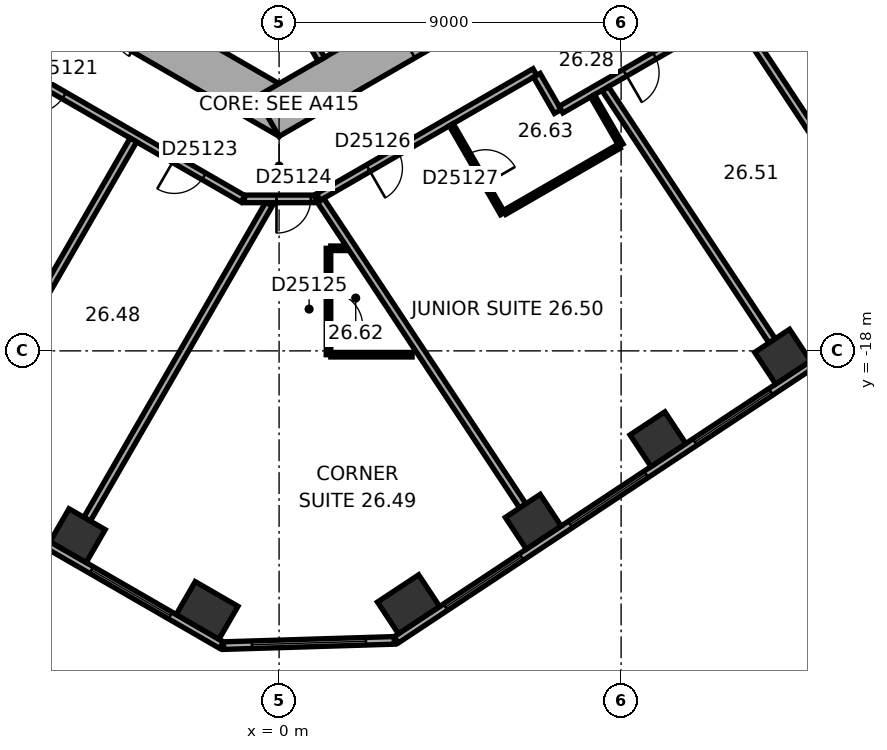
"""IFC4 building model, lengths in metres.
Left out: names, types, materials, properties, quantities, classifications, styles, units other than length and angle.
Written with IfcOpenShell. Run it as: python <this file> out.ifc"""

import sys

from ifc_helpers import new_model, si_unit, direction, frame, frame_2d, origin, origin_2d, place, context, subcontext, project, spatial, rectangle, extrude, element, fill, save


model = new_model("IFC4")
c1 = context("Model", 3, precision=1e-05, world=origin(), true_north=direction((0.0, 1.0)))
c2 = subcontext(c1, "Body", "Model", "MODEL_VIEW")
j1 = project(units=[si_unit("LENGTHUNIT", "METRE"), si_unit("PLANEANGLEUNIT", "RADIAN")], contexts=[c1])
p1 = place(None, origin())
s1 = spatial("IfcSite", under=j1, at=p1, CompositionType="ELEMENT")
p2 = place(p1, origin())
s2 = spatial("IfcBuilding", under=s1, at=p2, CompositionType="ELEMENT")
p3 = place(p2, frame((0.0, 0.0, 110.0)))
s3 = spatial("IfcBuildingStorey", under=s2, at=p3, CompositionType="ELEMENT", Elevation=110.0)
p4 = place(p3, frame((-5.302, -22.862, 0.0), z_axis=(0.0, 0.0, 1.0), x_axis=(0.866025403784, -0.5, 0.0)))
e1 = element("IfcColumn", 1, at=p4, inside=s3, PredefinedType="COLUMN", context=c2, shape_type="SweptSolid", body=[
    extrude(rectangle(XDim=1.1, YDim=1.0, at=origin_2d()), origin(), (0.0, 0.0, 1.0), 3.3),
])
for number, where, z_axis, x_axis in (
    (2, (-1.895, -24.829, 0.0), (0.0, 0.0, 1.0), (0.866, -0.5, 0.0)),
    (3, (3.407, -24.667, 0.0), (0.0, 0.0, 1.0), (0.834, 0.552, 0.0)),
):
    element("IfcColumn", number, at=place(p3, frame(where, z_axis=z_axis, x_axis=x_axis)), inside=s3, PredefinedType="COLUMN", context=c2, shape_type="SweptSolid", body=[
        extrude(rectangle(XDim=1.3, YDim=1.0, at=origin_2d()), origin(), (0.0, 0.0, 1.0), 3.3),
    ])
for number, where, z_axis, x_axis in (
    (4, (6.688, -22.496, 0.0), (0.0, 0.0, 1.0), (0.834, 0.552, 0.0)),
    (5, (9.969, -20.324, 0.0), (0.0, 0.0, 1.0), (0.834, 0.552, 0.0)),
    (6, (13.25, -18.152, 0.0), (0.0, 0.0, 1.0), (0.834, 0.552, 0.0)),
):
    element("IfcColumn", number, at=place(p3, frame(where, z_axis=z_axis, x_axis=x_axis)), inside=s3, PredefinedType="COLUMN", context=c2, shape_type="SweptSolid", body=[
        extrude(rectangle(XDim=1.1, YDim=1.0, at=origin_2d()), origin(), (0.0, 0.0, 1.0), 3.3),
    ])
p5 = place(p3, frame((-10.4, -5.658, 0.0), z_axis=(0.0, 0.0, 1.0), x_axis=(0.866021384402, -0.500006961711, 0.0)))
e7 = element("IfcWall", 7, at=p5, inside=s3, PredefinedType="SHEAR", context=c2, shape_type="SweptSolid", body=[
    extrude(rectangle(XDim=12.355, YDim=1.2, at=frame_2d((6.178, 0.0))), origin(), (0.0, 0.0, 1.0), 3.3),
])
p6 = place(p5, frame((6.378, 0.0, 0.0)))
e8 = element("IfcOpeningElement", 8, at=p6, cuts=e7, PredefinedType="OPENING", context=c2, shape_type="SweptSolid", body=[
    extrude(rectangle(XDim=1.5, YDim=2.1, at=frame_2d((0.75, 1.05))), frame((0.0, 0.61, 0.0), z_axis=(0.0, -1.0, 0.0), x_axis=(1.0, 0.0, 0.0)), (0.0, 0.0, 1.0), 1.22),
])
p7 = place(p5, frame((1.928, 0.0, 0.0)))
e9 = element("IfcOpeningElement", 9, at=p7, cuts=e7, PredefinedType="OPENING", context=c2, shape_type="SweptSolid", body=[
    extrude(rectangle(XDim=0.9, YDim=2.1, at=frame_2d((0.45, 1.05))), frame((0.0, 0.61, 0.0), z_axis=(0.0, -1.0, 0.0), x_axis=(1.0, 0.0, 0.0)), (0.0, 0.0, 1.0), 1.22),
])
p8 = place(p5, frame((4.528, 0.0, 0.0)))
e10 = element("IfcOpeningElement", 10, at=p8, cuts=e7, PredefinedType="OPENING", context=c2, shape_type="SweptSolid", body=[
    extrude(rectangle(XDim=0.9, YDim=2.1, at=frame_2d((0.45, 1.05))), frame((0.0, 0.61, 0.0), z_axis=(0.0, -1.0, 0.0), x_axis=(1.0, 0.0, 0.0)), (0.0, 0.0, 1.0), 1.22),
])
p9 = place(p3, frame((-0.3, -11.836, 0.0), z_axis=(0.0, 0.0, 1.0), x_axis=(0.866021384402, 0.500006961711, 0.0)))
e11 = element("IfcWall", 11, at=p9, inside=s3, PredefinedType="SHEAR", context=c2, shape_type="SweptSolid", body=[
    extrude(rectangle(XDim=12.355, YDim=1.2, at=frame_2d((6.178, 0.0))), origin(), (0.0, 0.0, 1.0), 3.3),
])
p10 = place(p9, frame((4.128, 0.0, 0.0)))
e12 = element("IfcOpeningElement", 12, at=p10, cuts=e11, PredefinedType="OPENING", context=c2, shape_type="SweptSolid", body=[
    extrude(rectangle(XDim=0.9, YDim=2.1, at=frame_2d((0.45, 1.05))), frame((0.0, 0.61, 0.0), z_axis=(0.0, -1.0, 0.0), x_axis=(1.0, 0.0, 0.0)), (0.0, 0.0, 1.0), 1.22),
])
p11 = place(p9, frame((7.928, 0.0, 0.0)))
e13 = element("IfcOpeningElement", 13, at=p11, cuts=e11, PredefinedType="OPENING", context=c2, shape_type="SweptSolid", body=[
    extrude(rectangle(XDim=1.1, YDim=2.1, at=frame_2d((0.55, 1.05))), frame((0.0, 0.61, 0.0), z_axis=(0.0, -1.0, 0.0), x_axis=(1.0, 0.0, 0.0)), (0.0, 0.0, 1.0), 1.22),
])
p12 = place(p3, frame((-19.914, -15.119, 0.0), z_axis=(0.0, 0.0, 1.0), x_axis=(0.866025418898, -0.499999973822, 0.0)))
e14 = element("IfcWall", 14, at=p12, inside=s3, PredefinedType="STANDARD", context=c2, shape_type="SweptSolid", body=[
    extrude(rectangle(XDim=21.246, YDim=0.2, at=frame_2d((10.623, 0.0))), origin(), (0.0, 0.0, 1.0), 3.3),
])
p13 = place(p12, frame((1.555, 0.0, 0.8)))
e15 = element("IfcOpeningElement", 15, at=p13, cuts=e14, PredefinedType="OPENING", context=c2, shape_type="SweptSolid", body=[
    extrude(rectangle(XDim=2.4, YDim=1.7, at=frame_2d((1.2, 0.85))), frame((0.0, 0.11, 0.0), z_axis=(0.0, -1.0, 0.0), x_axis=(1.0, 0.0, 0.0)), (0.0, 0.0, 1.0), 0.22),
])
p14 = place(p12, frame((5.489, 0.0, 0.8)))
e16 = element("IfcOpeningElement", 16, at=p14, cuts=e14, PredefinedType="OPENING", context=c2, shape_type="SweptSolid", body=[
    extrude(rectangle(XDim=2.4, YDim=1.7, at=frame_2d((1.2, 0.85))), frame((0.0, 0.11, 0.0), z_axis=(0.0, -1.0, 0.0), x_axis=(1.0, 0.0, 0.0)), (0.0, 0.0, 1.0), 0.22),
])
p15 = place(p12, frame((9.424, 0.0, 0.8)))
e17 = element("IfcOpeningElement", 17, at=p15, cuts=e14, PredefinedType="OPENING", context=c2, shape_type="SweptSolid", body=[
    extrude(rectangle(XDim=2.4, YDim=1.7, at=frame_2d((1.2, 0.85))), frame((0.0, 0.11, 0.0), z_axis=(0.0, -1.0, 0.0), x_axis=(1.0, 0.0, 0.0)), (0.0, 0.0, 1.0), 0.22),
])
p16 = place(p12, frame((13.358, 0.0, 0.8)))
e18 = element("IfcOpeningElement", 18, at=p16, cuts=e14, PredefinedType="OPENING", context=c2, shape_type="SweptSolid", body=[
    extrude(rectangle(XDim=2.4, YDim=1.7, at=frame_2d((1.2, 0.85))), frame((0.0, 0.11, 0.0), z_axis=(0.0, -1.0, 0.0), x_axis=(1.0, 0.0, 0.0)), (0.0, 0.0, 1.0), 0.22),
])
p17 = place(p12, frame((17.293, 0.0, 0.8)))
e19 = element("IfcOpeningElement", 19, at=p17, cuts=e14, PredefinedType="OPENING", context=c2, shape_type="SweptSolid", body=[
    extrude(rectangle(XDim=2.4, YDim=1.7, at=frame_2d((1.2, 0.85))), frame((0.0, 0.11, 0.0), z_axis=(0.0, -1.0, 0.0), x_axis=(1.0, 0.0, 0.0)), (0.0, 0.0, 1.0), 0.22),
])
p18 = place(p3, frame((-1.461, -25.755, 0.0), z_axis=(0.0, 0.0, 1.0), x_axis=(0.999533823446, 0.030530898895, 0.0)))
e20 = element("IfcWall", 20, at=p18, inside=s3, PredefinedType="STANDARD", context=c2, shape_type="SweptSolid", body=[
    extrude(rectangle(XDim=4.494, YDim=0.2, at=frame_2d((2.247, 0.0))), origin(), (0.0, 0.0, 1.0), 3.3),
])
p19 = place(p18, frame((0.747, 0.0, 0.8)))
e21 = element("IfcOpeningElement", 21, at=p19, cuts=e20, PredefinedType="OPENING", context=c2, shape_type="SweptSolid", body=[
    extrude(rectangle(XDim=3.0, YDim=1.7, at=frame_2d((1.5, 0.85))), frame((0.0, 0.11, 0.0), z_axis=(0.0, -1.0, 0.0), x_axis=(1.0, 0.0, 0.0)), (0.0, 0.0, 1.0), 0.22),
])
p20 = place(p3, frame((3.083, -25.601, 0.0), z_axis=(0.0, 0.0, 1.0), x_axis=(0.833884295743, 0.551939291329, 0.0)))
e22 = element("IfcWall", 22, at=p20, inside=s3, PredefinedType="STANDARD", context=c2, shape_type="SweptSolid", body=[
    extrude(rectangle(XDim=21.246, YDim=0.2, at=frame_2d((10.623, 0.0))), origin(), (0.0, 0.0, 1.0), 3.3),
])
p21 = place(p20, frame((1.553, 0.0, 0.8)))
e23 = element("IfcOpeningElement", 23, at=p21, cuts=e22, PredefinedType="OPENING", context=c2, shape_type="SweptSolid", body=[
    extrude(rectangle(XDim=2.4, YDim=1.7, at=frame_2d((1.2, 0.85))), frame((0.0, 0.11, 0.0), z_axis=(0.0, -1.0, 0.0), x_axis=(1.0, 0.0, 0.0)), (0.0, 0.0, 1.0), 0.22),
])
p22 = place(p20, frame((5.488, 0.0, 0.8)))
e24 = element("IfcOpeningElement", 24, at=p22, cuts=e22, PredefinedType="OPENING", context=c2, shape_type="SweptSolid", body=[
    extrude(rectangle(XDim=2.4, YDim=1.7, at=frame_2d((1.2, 0.85))), frame((0.0, 0.11, 0.0), z_axis=(0.0, -1.0, 0.0), x_axis=(1.0, 0.0, 0.0)), (0.0, 0.0, 1.0), 0.22),
])
p23 = place(p20, frame((9.422, 0.0, 0.8)))
e25 = element("IfcOpeningElement", 25, at=p23, cuts=e22, PredefinedType="OPENING", context=c2, shape_type="SweptSolid", body=[
    extrude(rectangle(XDim=2.4, YDim=1.7, at=frame_2d((1.2, 0.85))), frame((0.0, 0.11, 0.0), z_axis=(0.0, -1.0, 0.0), x_axis=(1.0, 0.0, 0.0)), (0.0, 0.0, 1.0), 0.22),
])
p24 = place(p20, frame((13.357, 0.0, 0.8)))
e26 = element("IfcOpeningElement", 26, at=p24, cuts=e22, PredefinedType="OPENING", context=c2, shape_type="SweptSolid", body=[
    extrude(rectangle(XDim=2.4, YDim=1.7, at=frame_2d((1.2, 0.85))), frame((0.0, 0.11, 0.0), z_axis=(0.0, -1.0, 0.0), x_axis=(1.0, 0.0, 0.0)), (0.0, 0.0, 1.0), 0.22),
])
p25 = place(p20, frame((17.291, 0.0, 0.8)))
e27 = element("IfcOpeningElement", 27, at=p25, cuts=e22, PredefinedType="OPENING", context=c2, shape_type="SweptSolid", body=[
    extrude(rectangle(XDim=2.4, YDim=1.7, at=frame_2d((1.2, 0.85))), frame((0.0, 0.11, 0.0), z_axis=(0.0, -1.0, 0.0), x_axis=(1.0, 0.0, 0.0)), (0.0, 0.0, 1.0), 0.22),
])
p26 = place(p3, frame((0.013, -8.422, 0.0), z_axis=(0.0, 0.0, 1.0), x_axis=(0.500077893725, -0.86598042715, 0.0)))
e28 = element("IfcWall", 28, at=p26, inside=s3, PredefinedType="PARTITIONING", context=c2, shape_type="SweptSolid", body=[
    extrude(rectangle(XDim=2.2, YDim=0.2, at=frame_2d((1.1, 0.0))), origin(), (0.0, 0.0, 1.0), 3.05),
])
p27 = place(p3, frame((-11.615, -7.843, 0.0), z_axis=(0.0, 0.0, 1.0), x_axis=(0.866026466995, -0.499998158461, 0.0)))
e29 = element("IfcWall", 29, at=p27, inside=s3, PredefinedType="PARTITIONING", context=c2, shape_type="SweptSolid", body=[
    extrude(rectangle(XDim=12.315, YDim=0.2, at=frame_2d((6.158, 0.0))), origin(), (0.0, 0.0, 1.0), 3.05),
])
p28 = place(p27, frame((5.983, 0.0, 0.0)))
e30 = element("IfcOpeningElement", 30, at=p28, cuts=e29, PredefinedType="OPENING", context=c2, shape_type="SweptSolid", body=[
    extrude(rectangle(XDim=0.9, YDim=2.1, at=frame_2d((0.45, 1.05))), frame((0.0, 0.11, 0.0), z_axis=(0.0, -1.0, 0.0), x_axis=(1.0, 0.0, 0.0)), (0.0, 0.0, 1.0), 0.22),
])
p29 = place(p27, frame((10.229, 0.0, 0.0)))
e31 = element("IfcOpeningElement", 31, at=p29, cuts=e29, PredefinedType="OPENING", context=c2, shape_type="SweptSolid", body=[
    extrude(rectangle(XDim=0.9, YDim=2.1, at=frame_2d((0.45, 1.05))), frame((0.0, 0.11, 0.0), z_axis=(0.0, -1.0, 0.0), x_axis=(1.0, 0.0, 0.0)), (0.0, 0.0, 1.0), 0.22),
])
p30 = place(p3, frame((-8.46, -20.461, 0.0), z_axis=(0.0, 0.0, 1.0), x_axis=(0.499999662836, 0.866025598446, 0.0)))
e32 = element("IfcWall", 32, at=p30, inside=s3, PredefinedType="PARTITIONING", context=c2, shape_type="SweptSolid", body=[
    extrude(rectangle(XDim=9.25, YDim=0.2, at=frame_2d((4.625, 0.0))), origin(), (0.0, 0.0, 1.0), 3.05),
])
p31 = place(p3, frame((-5.052, -22.429, 0.0), z_axis=(0.0, 0.0, 1.0), x_axis=(0.500004329283, 0.866022904257, 0.0)))
e33 = element("IfcWall", 33, at=p31, inside=s3, PredefinedType="PARTITIONING", context=c2, shape_type="SweptSolid", body=[
    extrude(rectangle(XDim=9.572, YDim=0.2, at=frame_2d((4.786, 0.0))), origin(), (0.0, 0.0, 1.0), 3.05),
])
p32 = place(p3, frame((-0.91, -14.001, 0.0), z_axis=(0.0, 0.0, 1.0), x_axis=(1.0, 0.0, 0.0)))
e34 = element("IfcWall", 34, at=p32, inside=s3, PredefinedType="PARTITIONING", context=c2, shape_type="SweptSolid", body=[
    extrude(rectangle(XDim=1.86, YDim=0.2, at=frame_2d((0.93, 0.0))), origin(), (0.0, 0.0, 1.0), 3.05),
])
p33 = place(p32, frame((0.842, 0.0, 0.0)))
e35 = element("IfcOpeningElement", 35, at=p33, cuts=e34, PredefinedType="OPENING", context=c2, shape_type="SweptSolid", body=[
    extrude(rectangle(XDim=0.9, YDim=2.1, at=frame_2d((0.45, 1.05))), frame((0.0, 0.11, 0.0), z_axis=(0.0, -1.0, 0.0), x_axis=(1.0, 0.0, 0.0)), (0.0, 0.0, 1.0), 0.22),
])
p34 = place(p3, frame((1.033, -13.953, 0.0), z_axis=(0.0, 0.0, 1.0), x_axis=(0.866017531406, 0.500013635111, 0.0)))
e36 = element("IfcWall", 36, at=p34, inside=s3, PredefinedType="PARTITIONING", context=c2, shape_type="SweptSolid", body=[
    extrude(rectangle(XDim=6.58, YDim=0.2, at=frame_2d((3.29, 0.0))), origin(), (0.0, 0.0, 1.0), 3.05),
])
p35 = place(p34, frame((1.515, 0.0, 0.0)))
e37 = element("IfcOpeningElement", 37, at=p35, cuts=e36, PredefinedType="OPENING", context=c2, shape_type="SweptSolid", body=[
    extrude(rectangle(XDim=0.9, YDim=2.1, at=frame_2d((0.45, 1.05))), frame((0.0, 0.11, 0.0), z_axis=(0.0, -1.0, 0.0), x_axis=(1.0, 0.0, 0.0)), (0.0, 0.0, 1.0), 0.22),
])
p36 = place(p3, frame((1.3, -18.101, 0.0), z_axis=(0.0, 0.0, 1.0), x_axis=(0.0, 1.0, 0.0)))
e38 = element("IfcWall", 38, at=p36, inside=s3, PredefinedType="PARTITIONING", context=c2, shape_type="SweptSolid", body=[
    extrude(rectangle(XDim=2.8, YDim=0.12, at=frame_2d((1.4, 0.0))), origin(), (0.0, 0.0, 1.0), 3.05),
])
p37 = place(p36, frame((0.75, 0.0, 0.0)))
e39 = element("IfcOpeningElement", 39, at=p37, cuts=e38, PredefinedType="OPENING", context=c2, shape_type="SweptSolid", body=[
    extrude(rectangle(XDim=0.9, YDim=2.1, at=frame_2d((0.45, 1.05))), frame((0.0, 0.07, 0.0), z_axis=(0.0, -1.0, 0.0), x_axis=(1.0, 0.0, 0.0)), (0.0, 0.0, 1.0), 0.14),
])
p38 = place(p3, frame((1.36, -15.301, 0.0), z_axis=(0.0, 0.0, 1.0), x_axis=(1.0, 0.0, 0.0)))
e40 = element("IfcWall", 40, at=p38, inside=s3, PredefinedType="PARTITIONING", context=c2, shape_type="SweptSolid", body=[
    extrude(rectangle(XDim=0.416, YDim=0.12, at=frame_2d((0.208, 0.0))), origin(), (0.0, 0.0, 1.0), 3.05),
])
p39 = place(p3, frame((3.5, -18.101, 0.0), z_axis=(0.0, 0.0, 1.0), x_axis=(-1.0, 0.0, 0.0)))
e41 = element("IfcWall", 41, at=p39, inside=s3, PredefinedType="PARTITIONING", context=c2, shape_type="SweptSolid", body=[
    extrude(rectangle(XDim=2.14, YDim=0.12, at=frame_2d((1.07, 0.0))), origin(), (0.0, 0.0, 1.0), 3.05),
])
p40 = place(p3, frame((5.881, -14.387, 0.0), z_axis=(0.0, 0.0, 1.0), x_axis=(-0.500048589285, 0.86599734893, 0.0)))
e42 = element("IfcWall", 42, at=p40, inside=s3, PredefinedType="PARTITIONING", context=c2, shape_type="SweptSolid", body=[
    extrude(rectangle(XDim=2.7, YDim=0.12, at=frame_2d((1.35, 0.0))), origin(), (0.0, 0.0, 1.0), 3.05),
])
p41 = place(p40, frame((0.9, 0.0, 0.0)))
e43 = element("IfcOpeningElement", 43, at=p41, cuts=e42, PredefinedType="OPENING", context=c2, shape_type="SweptSolid", body=[
    extrude(rectangle(XDim=0.9, YDim=2.1, at=frame_2d((0.45, 1.05))), frame((0.0, 0.07, 0.0), z_axis=(0.0, -1.0, 0.0), x_axis=(1.0, 0.0, 0.0)), (0.0, 0.0, 1.0), 0.14),
])
p42 = place(p3, frame((6.412, -22.079, 0.0), z_axis=(0.0, 0.0, 1.0), x_axis=(-0.551919507115, 0.83389739037, 0.0)))
e44 = element("IfcWall", 44, at=p42, inside=s3, PredefinedType="PARTITIONING", context=c2, shape_type="SweptSolid", body=[
    extrude(rectangle(XDim=9.635, YDim=0.2, at=frame_2d((4.817, 0.0))), origin(), (0.0, 0.0, 1.0), 3.05),
])
p43 = place(p3, frame((6.782, -10.749, 0.0), z_axis=(0.0, 0.0, 1.0), x_axis=(0.500074377092, -0.865982457891, 0.0)))
e45 = element("IfcWall", 45, at=p43, inside=s3, PredefinedType="PARTITIONING", context=c2, shape_type="SweptSolid", body=[
    extrude(rectangle(XDim=1.101, YDim=0.2, at=frame_2d((0.55, 0.0))), origin(), (0.0, 0.0, 1.0), 3.05),
])
p44 = place(p3, frame((7.419, -11.653, 0.0), z_axis=(0.0, 0.0, 1.0), x_axis=(0.866038154057, 0.49997791523, 0.0)))
e46 = element("IfcWall", 46, at=p44, inside=s3, PredefinedType="PARTITIONING", context=c2, shape_type="SweptSolid", body=[
    extrude(rectangle(XDim=3.502, YDim=0.2, at=frame_2d((1.751, 0.0))), origin(), (0.0, 0.0, 1.0), 3.05),
])
p45 = place(p44, frame((1.94, 0.0, 0.0)))
e47 = element("IfcOpeningElement", 47, at=p45, cuts=e46, PredefinedType="OPENING", context=c2, shape_type="SweptSolid", body=[
    extrude(rectangle(XDim=0.9, YDim=2.1, at=frame_2d((0.45, 1.05))), frame((0.0, 0.11, 0.0), z_axis=(0.0, -1.0, 0.0), x_axis=(1.0, 0.0, 0.0)), (0.0, 0.0, 1.0), 0.22),
])
p46 = place(p3, frame((8.249, -11.289, 0.0), z_axis=(0.0, 0.0, 1.0), x_axis=(0.499957405522, -0.866049994321, 0.0)))
e48 = element("IfcWall", 48, at=p46, inside=s3, PredefinedType="PARTITIONING", context=c2, shape_type="SweptSolid", body=[
    extrude(rectangle(XDim=1.499, YDim=0.12, at=frame_2d((0.75, 0.0))), origin(), (0.0, 0.0, 1.0), 3.05),
])
p47 = place(p3, frame((8.946, -12.617, 0.0), z_axis=(0.0, 0.0, 1.0), x_axis=(-0.865989304205, -0.500062521093, 0.0)))
e49 = element("IfcWall", 49, at=p47, inside=s3, PredefinedType="PARTITIONING", context=c2, shape_type="SweptSolid", body=[
    extrude(rectangle(XDim=3.48, YDim=0.12, at=frame_2d((1.74, 0.0))), origin(), (0.0, 0.0, 1.0), 3.05),
])
p48 = place(p3, frame((12.974, -17.735, 0.0), z_axis=(0.0, 0.0, 1.0), x_axis=(-0.55192625685, 0.833892922982, 0.0)))
e50 = element("IfcWall", 50, at=p48, inside=s3, PredefinedType="PARTITIONING", context=c2, shape_type="SweptSolid", body=[
    extrude(rectangle(XDim=7.95, YDim=0.2, at=frame_2d((3.975, 0.0))), origin(), (0.0, 0.0, 1.0), 3.05),
])
p49 = place(p3, frame((16.255, -15.564, 0.0), z_axis=(0.0, 0.0, 1.0), x_axis=(-0.55192208744, 0.833895682562, 0.0)))
e51 = element("IfcWall", 51, at=p49, inside=s3, PredefinedType="PARTITIONING", context=c2, shape_type="SweptSolid", body=[
    extrude(rectangle(XDim=8.913, YDim=0.2, at=frame_2d((4.457, 0.0))), origin(), (0.0, 0.0, 1.0), 2.6),
])
p50 = place(p17, origin())
e52 = element("IfcWindow", 52, at=p50, inside=s3, PartitioningType="SINGLE_PANEL", PredefinedType="WINDOW", context=c2, shape_type="SweptSolid", body=[
    extrude(rectangle(XDim=2.4, YDim=1.7, at=frame_2d((1.2, 0.85))), frame((0.0, 0.03, 0.0), z_axis=(0.0, -1.0, 0.0), x_axis=(1.0, 0.0, 0.0)), (0.0, 0.0, 1.0), 0.06),
])
fill(e19, e52)
p51 = place(p19, origin())
e53 = element("IfcWindow", 53, at=p51, inside=s3, PartitioningType="SINGLE_PANEL", PredefinedType="WINDOW", context=c2, shape_type="SweptSolid", body=[
    extrude(rectangle(XDim=3.0, YDim=1.7, at=frame_2d((1.5, 0.85))), frame((0.0, 0.03, 0.0), z_axis=(0.0, -1.0, 0.0), x_axis=(1.0, 0.0, 0.0)), (0.0, 0.0, 1.0), 0.06),
])
fill(e21, e53)
p52 = place(p21, origin())
e54 = element("IfcWindow", 54, at=p52, inside=s3, PartitioningType="SINGLE_PANEL", PredefinedType="WINDOW", context=c2, shape_type="SweptSolid", body=[
    extrude(rectangle(XDim=2.4, YDim=1.7, at=frame_2d((1.2, 0.85))), frame((0.0, 0.03, 0.0), z_axis=(0.0, -1.0, 0.0), x_axis=(1.0, 0.0, 0.0)), (0.0, 0.0, 1.0), 0.06),
])
fill(e23, e54)
p53 = place(p22, origin())
e55 = element("IfcWindow", 55, at=p53, inside=s3, PartitioningType="SINGLE_PANEL", PredefinedType="WINDOW", context=c2, shape_type="SweptSolid", body=[
    extrude(rectangle(XDim=2.4, YDim=1.7, at=frame_2d((1.2, 0.85))), frame((0.0, 0.03, 0.0), z_axis=(0.0, -1.0, 0.0), x_axis=(1.0, 0.0, 0.0)), (0.0, 0.0, 1.0), 0.06),
])
fill(e24, e55)
p54 = place(p23, origin())
e56 = element("IfcWindow", 56, at=p54, inside=s3, PartitioningType="SINGLE_PANEL", PredefinedType="WINDOW", context=c2, shape_type="SweptSolid", body=[
    extrude(rectangle(XDim=2.4, YDim=1.7, at=frame_2d((1.2, 0.85))), frame((0.0, 0.03, 0.0), z_axis=(0.0, -1.0, 0.0), x_axis=(1.0, 0.0, 0.0)), (0.0, 0.0, 1.0), 0.06),
])
fill(e25, e56)
p55 = place(p28, origin())
e57 = element("IfcDoor", 57, at=p55, inside=s3, OperationType="SINGLE_SWING_LEFT", PredefinedType="DOOR", context=c2, shape_type="SweptSolid", body=[
    extrude(rectangle(XDim=0.9, YDim=2.1, at=frame_2d((0.45, 1.05))), frame((0.0, 0.025, 0.0), z_axis=(0.0, -1.0, 0.0), x_axis=(1.0, 0.0, 0.0)), (0.0, 0.0, 1.0), 0.05),
])
fill(e30, e57)
p56 = place(p29, origin())
e58 = element("IfcDoor", 58, at=p56, inside=s3, OperationType="SINGLE_SWING_LEFT", PredefinedType="DOOR", context=c2, shape_type="SweptSolid", body=[
    extrude(rectangle(XDim=0.9, YDim=2.1, at=frame_2d((0.45, 1.05))), frame((0.0, 0.025, 0.0), z_axis=(0.0, -1.0, 0.0), x_axis=(1.0, 0.0, 0.0)), (0.0, 0.0, 1.0), 0.05),
])
fill(e31, e58)
p57 = place(p33, origin())
e59 = element("IfcDoor", 59, at=p57, inside=s3, OperationType="SINGLE_SWING_LEFT", PredefinedType="DOOR", context=c2, shape_type="SweptSolid", body=[
    extrude(rectangle(XDim=0.9, YDim=2.1, at=frame_2d((0.45, 1.05))), frame((0.0, 0.025, 0.0), z_axis=(0.0, -1.0, 0.0), x_axis=(1.0, 0.0, 0.0)), (0.0, 0.0, 1.0), 0.05),
])
fill(e35, e59)
p58 = place(p37, origin())
e60 = element("IfcDoor", 60, at=p58, inside=s3, OperationType="SINGLE_SWING_LEFT", PredefinedType="DOOR", context=c2, shape_type="SweptSolid", body=[
    extrude(rectangle(XDim=0.9, YDim=2.1, at=frame_2d((0.45, 1.05))), frame((0.0, 0.025, 0.0), z_axis=(0.0, -1.0, 0.0), x_axis=(1.0, 0.0, 0.0)), (0.0, 0.0, 1.0), 0.05),
])
fill(e39, e60)
p59 = place(p35, origin())
e61 = element("IfcDoor", 61, at=p59, inside=s3, OperationType="SINGLE_SWING_LEFT", PredefinedType="DOOR", context=c2, shape_type="SweptSolid", body=[
    extrude(rectangle(XDim=0.9, YDim=2.1, at=frame_2d((0.45, 1.05))), frame((0.0, 0.025, 0.0), z_axis=(0.0, -1.0, 0.0), x_axis=(1.0, 0.0, 0.0)), (0.0, 0.0, 1.0), 0.05),
])
fill(e37, e61)
p60 = place(p41, origin())
e62 = element("IfcDoor", 62, at=p60, inside=s3, OperationType="SINGLE_SWING_LEFT", PredefinedType="DOOR", context=c2, shape_type="SweptSolid", body=[
    extrude(rectangle(XDim=0.9, YDim=2.1, at=frame_2d((0.45, 1.05))), frame((0.0, 0.025, 0.0), z_axis=(0.0, -1.0, 0.0), x_axis=(1.0, 0.0, 0.0)), (0.0, 0.0, 1.0), 0.05),
])
fill(e43, e62)
p61 = place(p45, origin())
e63 = element("IfcDoor", 63, at=p61, inside=s3, OperationType="SINGLE_SWING_LEFT", PredefinedType="DOOR", context=c2, shape_type="SweptSolid", body=[
    extrude(rectangle(XDim=0.9, YDim=2.1, at=frame_2d((0.45, 1.05))), frame((0.0, 0.025, 0.0), z_axis=(0.0, -1.0, 0.0), x_axis=(1.0, 0.0, 0.0)), (0.0, 0.0, 1.0), 0.05),
])
fill(e47, e63)
save(model, sys.argv[1])
